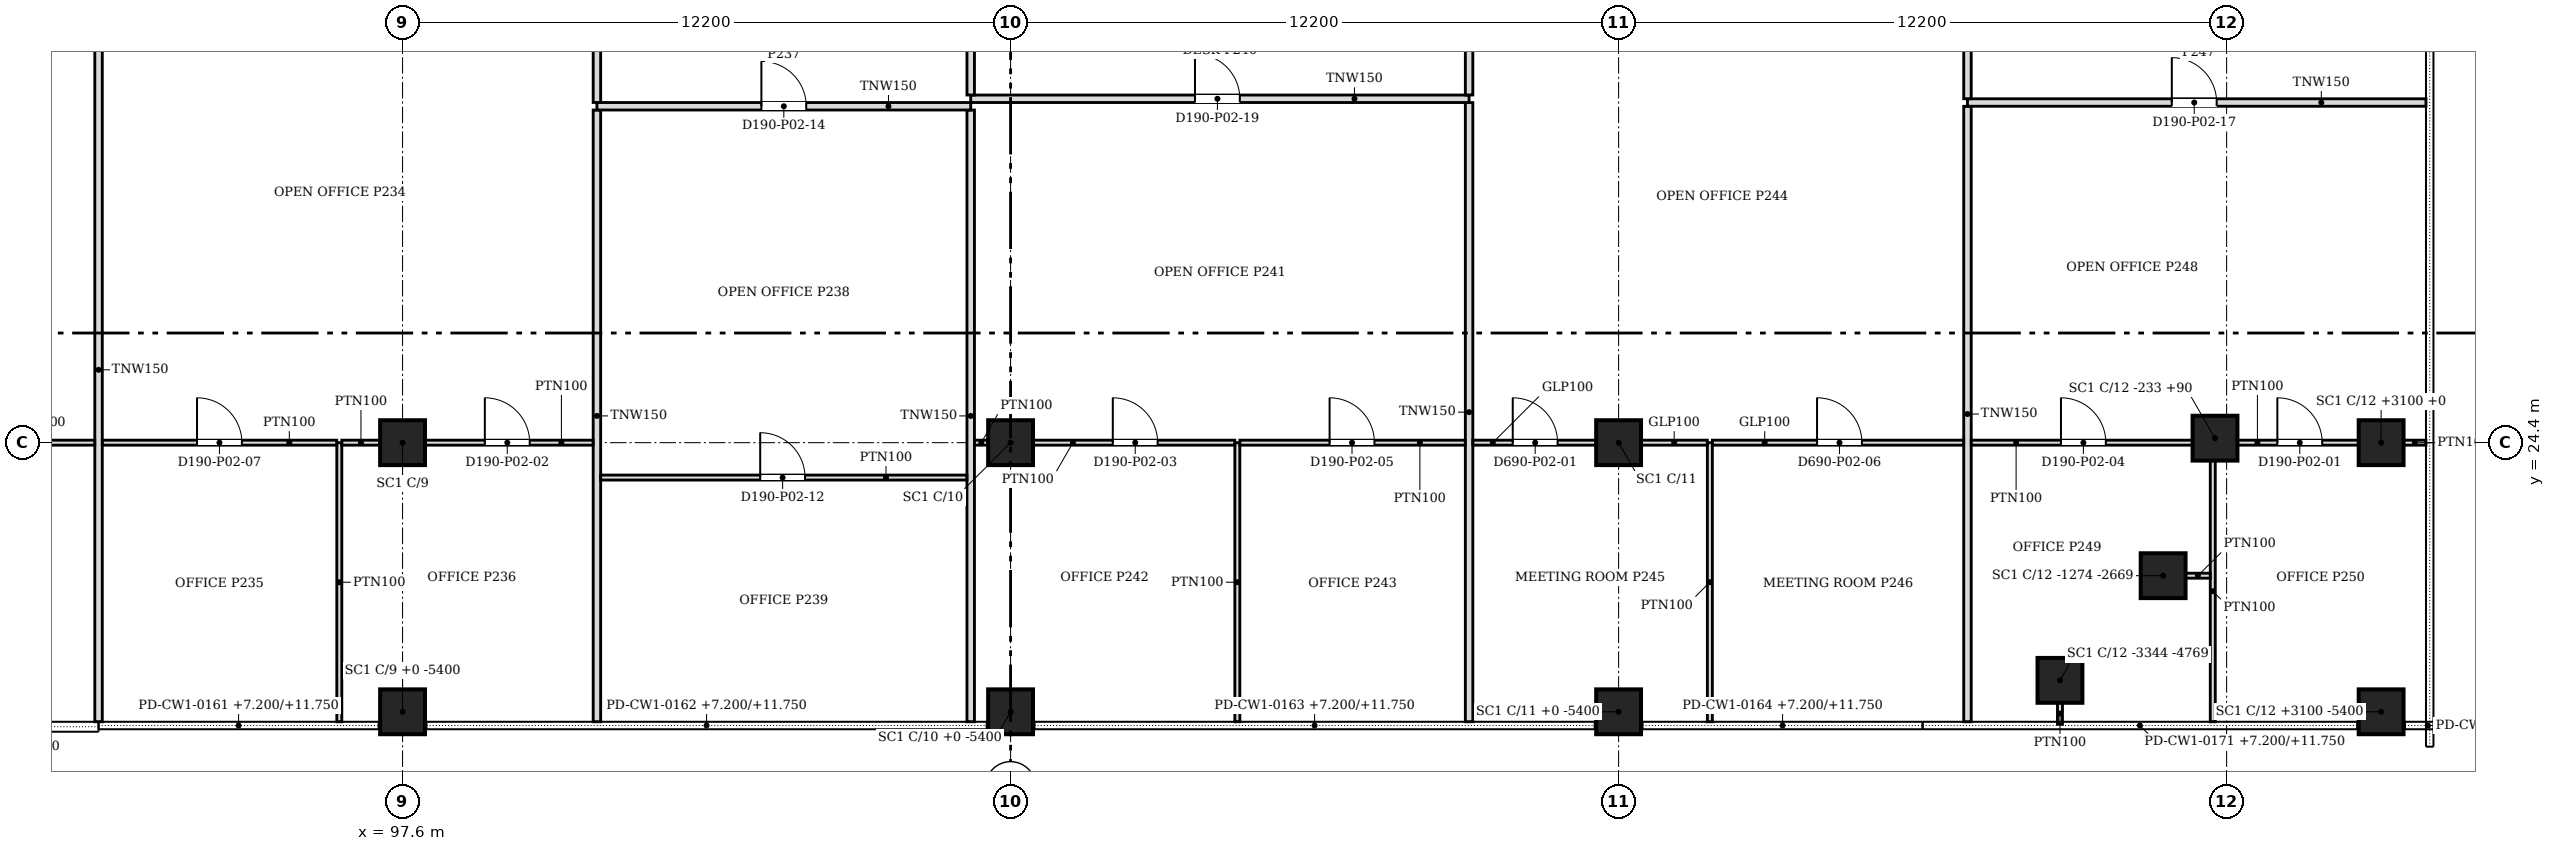
"""IFC4 building model, lengths in metres.
Left out: names, types, materials, properties, quantities, classifications, styles, units other than length and angle.
Written with IfcOpenShell. Run it as: python <this file> out.ifc"""

import sys

from ifc_helpers import new_model, si_unit, direction, frame, frame_2d, origin, origin_2d, place, context, subcontext, project, spatial, rectangle, extrude, source, transform, mapped, element, fill, save


model = new_model("IFC4")
c1 = context("Model", 3, precision=1e-05, world=origin(), true_north=direction((0.0, 1.0)))
c2 = subcontext(c1, "Body", "Model", "MODEL_VIEW")
j1 = project(units=[si_unit("LENGTHUNIT", "METRE"), si_unit("PLANEANGLEUNIT", "RADIAN")], contexts=[c1])
p1 = place(None, origin())
s1 = spatial("IfcSite", under=j1, at=p1, CompositionType="ELEMENT")
p2 = place(p1, origin())
s2 = spatial("IfcBuilding", under=s1, at=p2, CompositionType="ELEMENT")
p3 = place(p2, frame((0.0, 0.0, 7.2)))
s3 = spatial("IfcBuildingStorey", under=s2, at=p3, CompositionType="ELEMENT", Elevation=7.2)
for number, where, z_axis, x_axis in (
    (1, (130.856, 19.631, 0.0), (0.0, 0.0, 1.0), (1.0, 0.0, 0.0)),
    (2, (132.926, 21.731, 0.0), (0.0, 0.0, 1.0), (1.0, 0.0, 0.0)),
    (3, (133.967, 24.49, 0.0), (0.0, 0.0, 1.0), (1.0, 0.0, 0.0)),
    (4, (97.6, 24.4, 0.0), (0.0, 0.0, 1.0), (1.0, 0.0, 0.0)),
    (5, (109.8, 24.4, 0.0), (0.0, 0.0, 1.0), (1.0, 0.0, 0.0)),
    (6, (122.0, 24.4, 0.0), (0.0, 0.0, 1.0), (1.0, 0.0, 0.0)),
    (7, (137.3, 24.4, 0.0), (0.0, 0.0, 1.0), (1.0, 0.0, 0.0)),
    (8, (97.6, 19.0, 0.0), (0.0, 0.0, 1.0), (1.0, 0.0, 0.0)),
    (9, (109.8, 19.0, 0.0), (0.0, 0.0, 1.0), (1.0, 0.0, 0.0)),
    (10, (122.0, 19.0, 0.0), (0.0, 0.0, 1.0), (1.0, 0.0, 0.0)),
    (11, (137.3, 19.0, 0.0), (0.0, 0.0, 1.0), (1.0, 0.0, 0.0)),
):
    element("IfcColumn", number, at=place(p3, frame(where, z_axis=z_axis, x_axis=x_axis)), inside=s3, PredefinedType="COLUMN", context=c2, shape_type="SweptSolid", body=[
        extrude(rectangle(XDim=0.9, YDim=0.9, at=origin_2d()), origin(), (0.0, 0.0, 1.0), 4.55),
    ])
p4 = place(p3, frame((91.5, 18.8, 0.0), z_axis=(0.0, 0.0, 1.0), x_axis=(0.0, 1.0, 0.0)))
e12 = element("IfcWall", 12, at=p4, inside=s3, PredefinedType="PARTITIONING", context=c2, shape_type="SweptSolid", body=[
    extrude(rectangle(XDim=14.124, YDim=0.15, at=frame_2d((7.062, 0.0))), origin(), (0.0, 0.0, 1.0), 3.715),
])
p5 = place(p3, frame((96.331, 18.8, 0.0), z_axis=(0.0, 0.0, 1.0), x_axis=(0.0, 1.0, 0.0)))
e13 = element("IfcWall", 13, at=p5, inside=s3, PredefinedType="PARTITIONING", context=c2, shape_type="SweptSolid", body=[
    extrude(rectangle(XDim=5.6, YDim=0.1, at=frame_2d((2.8, 0.0))), origin(), (0.0, 0.0, 1.0), 3.715),
])
for number, where, z_axis, x_axis in (
    (14, (101.5, 18.8, 0.0), (0.0, 0.0, 1.0), (0.0, 1.0, 0.0)),
    (15, (109.0, 18.8, 0.0), (0.0, 0.0, 1.0), (0.0, 1.0, 0.0)),
):
    element("IfcWall", number, at=place(p3, frame(where, z_axis=z_axis, x_axis=x_axis)), inside=s3, PredefinedType="PARTITIONING", context=c2, shape_type="SweptSolid", body=[
        extrude(rectangle(XDim=12.274, YDim=0.15, at=frame_2d((6.137, 0.0))), origin(), (0.0, 0.0, 1.0), 3.715),
    ])
p6 = place(p3, frame((114.35, 18.8, 0.0), z_axis=(0.0, 0.0, 1.0), x_axis=(0.0, 1.0, 0.0)))
e16 = element("IfcWall", 16, at=p6, inside=s3, PredefinedType="PARTITIONING", context=c2, shape_type="SweptSolid", body=[
    extrude(rectangle(XDim=5.6, YDim=0.1, at=frame_2d((2.8, 0.0))), origin(), (0.0, 0.0, 1.0), 3.715),
])
p7 = place(p3, frame((119.0, 18.8, 0.0), z_axis=(0.0, 0.0, 1.0), x_axis=(0.0, 1.0, 0.0)))
e17 = element("IfcWall", 17, at=p7, inside=s3, PredefinedType="PARTITIONING", context=c2, shape_type="SweptSolid", body=[
    extrude(rectangle(XDim=12.424, YDim=0.15, at=frame_2d((6.212, 0.0))), origin(), (0.0, 0.0, 1.0), 3.715),
])
p8 = place(p3, frame((123.831, 18.8, 0.0), z_axis=(0.0, 0.0, 1.0), x_axis=(0.0, 1.0, 0.0)))
e18 = element("IfcWall", 18, at=p8, inside=s3, PredefinedType="PARTITIONING", context=c2, shape_type="SweptSolid", body=[
    extrude(rectangle(XDim=5.6, YDim=0.1, at=frame_2d((2.8, 0.0))), origin(), (0.0, 0.0, 1.0), 3.715),
])
p9 = place(p3, frame((129.0, 18.8, 0.0), z_axis=(0.0, 0.0, 1.0), x_axis=(0.0, 1.0, 0.0)))
e19 = element("IfcWall", 19, at=p9, inside=s3, PredefinedType="PARTITIONING", context=c2, shape_type="SweptSolid", body=[
    extrude(rectangle(XDim=12.349, YDim=0.15, at=frame_2d((6.174, 0.0))), origin(), (0.0, 0.0, 1.0), 3.715),
])
p10 = place(p3, frame((133.922, 18.8, 0.0), z_axis=(0.0, 0.0, 1.0), x_axis=(0.0, 1.0, 0.0)))
e20 = element("IfcWall", 20, at=p10, inside=s3, PredefinedType="PARTITIONING", context=c2, shape_type="SweptSolid", body=[
    extrude(rectangle(XDim=5.239, YDim=0.1, at=frame_2d((2.62, 0.0))), origin(), (0.0, 0.0, 1.0), 3.715),
])
p11 = place(p3, frame((130.856, 19.181, 0.0), z_axis=(0.0, 0.0, 1.0), x_axis=(0.0, -1.0, 0.0)))
e21 = element("IfcWall", 21, at=p11, inside=s3, PredefinedType="PARTITIONING", context=c2, shape_type="SweptSolid", body=[
    extrude(rectangle(XDim=0.431, YDim=0.1, at=frame_2d((0.215, 0.0))), origin(), (0.0, 0.0, 1.0), 3.715),
])
p12 = place(p3, frame((133.376, 21.731, 0.0), z_axis=(0.0, 0.0, 1.0), x_axis=(1.0, 0.0, 0.0)))
e22 = element("IfcWall", 22, at=p12, inside=s3, PredefinedType="PARTITIONING", context=c2, shape_type="SweptSolid", body=[
    extrude(rectangle(XDim=0.496, YDim=0.1, at=frame_2d((0.248, 0.0))), origin(), (0.0, 0.0, 1.0), 3.715),
])
p13 = place(p3, frame((108.924, 23.7, 0.0), z_axis=(0.0, 0.0, 1.0), x_axis=(-1.0, 0.0, 0.0)))
e23 = element("IfcWall", 23, at=p13, inside=s3, PredefinedType="PARTITIONING", context=c2, shape_type="SweptSolid", body=[
    extrude(rectangle(XDim=7.348, YDim=0.1, at=frame_2d((3.674, 0.0))), origin(), (0.0, 0.0, 1.0), 3.715),
])
m1 = source(origin(), c2, "Body", "SweptSolid", [
    extrude(rectangle(XDim=0.9, YDim=2.1, at=frame_2d((0.45, 1.05))), frame((0.0, 0.06, 0.0), z_axis=(0.0, -1.0, 0.0), x_axis=(1.0, 0.0, 0.0)), (0.0, 0.0, 1.0), 0.12),
])
p14 = place(p13, frame((3.248, 0.0, 0.0)))
e24 = element("IfcOpeningElement", 24, at=p14, cuts=e23, PredefinedType="OPENING", context=c2, shape_type="MappedRepresentation", body=[
    mapped(m1, transform((0.0, 0.0, 0.0), scale=1.0)),
])
p15 = place(p3, frame((91.424, 24.4, 0.0), z_axis=(0.0, 0.0, 1.0), x_axis=(-1.0, 0.0, 0.0)))
e25 = element("IfcWall", 25, at=p15, inside=s3, PredefinedType="PARTITIONING", context=c2, shape_type="SweptSolid", body=[
    extrude(rectangle(XDim=5.323, YDim=0.1, at=frame_2d((2.662, 0.0))), origin(), (0.0, 0.0, 1.0), 3.715),
])
p16 = place(p15, frame((2.223, 0.0, 0.0)))
e26 = element("IfcOpeningElement", 26, at=p16, cuts=e25, PredefinedType="OPENING", context=c2, shape_type="MappedRepresentation", body=[
    mapped(m1, transform((0.0, 0.0, 0.0), scale=1.0)),
])
p17 = place(p3, frame((96.28, 24.4, 0.0), z_axis=(0.0, 0.0, 1.0), x_axis=(-1.0, 0.0, 0.0)))
e27 = element("IfcWall", 27, at=p17, inside=s3, PredefinedType="PARTITIONING", context=c2, shape_type="SweptSolid", body=[
    extrude(rectangle(XDim=4.704, YDim=0.1, at=frame_2d((2.352, 0.0))), origin(), (0.0, 0.0, 1.0), 3.715),
])
p18 = place(p17, frame((1.904, 0.0, 0.0)))
e28 = element("IfcOpeningElement", 28, at=p18, cuts=e27, PredefinedType="OPENING", context=c2, shape_type="MappedRepresentation", body=[
    mapped(m1, transform((0.0, 0.0, 0.0), scale=1.0)),
])
p19 = place(p3, frame((96.382, 24.4, 0.0), z_axis=(0.0, 0.0, 1.0), x_axis=(1.0, 0.0, 0.0)))
e29 = element("IfcWall", 29, at=p19, inside=s3, PredefinedType="PARTITIONING", context=c2, shape_type="SweptSolid", body=[
    extrude(rectangle(XDim=0.767, YDim=0.1, at=frame_2d((0.384, 0.0))), origin(), (0.0, 0.0, 1.0), 3.715),
])
p20 = place(p3, frame((101.424, 24.4, 0.0), z_axis=(0.0, 0.0, 1.0), x_axis=(-1.0, 0.0, 0.0)))
e30 = element("IfcWall", 30, at=p20, inside=s3, PredefinedType="PARTITIONING", context=c2, shape_type="SweptSolid", body=[
    extrude(rectangle(XDim=3.373, YDim=0.1, at=frame_2d((1.687, 0.0))), origin(), (0.0, 0.0, 1.0), 3.715),
])
p21 = place(p20, frame((1.273, 0.0, 0.0)))
e31 = element("IfcOpeningElement", 31, at=p21, cuts=e30, PredefinedType="OPENING", context=c2, shape_type="MappedRepresentation", body=[
    mapped(m1, transform((0.0, 0.0, 0.0), scale=1.0)),
])
p22 = place(p3, frame((109.076, 24.4, 0.0), z_axis=(0.0, 0.0, 1.0), x_axis=(1.0, 0.0, 0.0)))
e32 = element("IfcWall", 32, at=p22, inside=s3, PredefinedType="PARTITIONING", context=c2, shape_type="SweptSolid", body=[
    extrude(rectangle(XDim=0.273, YDim=0.1, at=frame_2d((0.137, 0.0))), origin(), (0.0, 0.0, 1.0), 3.715),
])
p23 = place(p3, frame((114.299, 24.4, 0.0), z_axis=(0.0, 0.0, 1.0), x_axis=(-1.0, 0.0, 0.0)))
e33 = element("IfcWall", 33, at=p23, inside=s3, PredefinedType="PARTITIONING", context=c2, shape_type="SweptSolid", body=[
    extrude(rectangle(XDim=4.048, YDim=0.1, at=frame_2d((2.024, 0.0))), origin(), (0.0, 0.0, 1.0), 3.715),
])
p24 = place(p23, frame((1.548, 0.0, 0.0)))
e34 = element("IfcOpeningElement", 34, at=p24, cuts=e33, PredefinedType="OPENING", context=c2, shape_type="MappedRepresentation", body=[
    mapped(m1, transform((0.0, 0.0, 0.0), scale=1.0)),
])
p25 = place(p3, frame((118.924, 24.4, 0.0), z_axis=(0.0, 0.0, 1.0), x_axis=(-1.0, 0.0, 0.0)))
e35 = element("IfcWall", 35, at=p25, inside=s3, PredefinedType="PARTITIONING", context=c2, shape_type="SweptSolid", body=[
    extrude(rectangle(XDim=4.523, YDim=0.1, at=frame_2d((2.262, 0.0))), origin(), (0.0, 0.0, 1.0), 3.715),
])
p26 = place(p25, frame((1.823, 0.0, 0.0)))
e36 = element("IfcOpeningElement", 36, at=p26, cuts=e35, PredefinedType="OPENING", context=c2, shape_type="MappedRepresentation", body=[
    mapped(m1, transform((0.0, 0.0, 0.0), scale=1.0)),
])
p27 = place(p3, frame((121.549, 24.4, 0.0), z_axis=(0.0, 0.0, 1.0), x_axis=(-1.0, 0.0, 0.0)))
e37 = element("IfcWall", 37, at=p27, inside=s3, PredefinedType="PARTITIONING", context=c2, shape_type="SweptSolid", body=[
    extrude(rectangle(XDim=2.473, YDim=0.1, at=frame_2d((1.237, 0.0))), origin(), (0.0, 0.0, 1.0), 3.715),
])
p28 = place(p27, frame((0.773, 0.0, 0.0)))
e38 = element("IfcOpeningElement", 38, at=p28, cuts=e37, PredefinedType="OPENING", context=c2, shape_type="MappedRepresentation", body=[
    mapped(m1, transform((0.0, 0.0, 0.0), scale=1.0)),
])
p29 = place(p3, frame((122.451, 24.4, 0.0), z_axis=(0.0, 0.0, 1.0), x_axis=(1.0, 0.0, 0.0)))
e39 = element("IfcWall", 39, at=p29, inside=s3, PredefinedType="PARTITIONING", context=c2, shape_type="SweptSolid", body=[
    extrude(rectangle(XDim=1.329, YDim=0.1, at=frame_2d((0.665, 0.0))), origin(), (0.0, 0.0, 1.0), 3.715),
])
p30 = place(p3, frame((128.924, 24.4, 0.0), z_axis=(0.0, 0.0, 1.0), x_axis=(-1.0, 0.0, 0.0)))
e40 = element("IfcWall", 40, at=p30, inside=s3, PredefinedType="PARTITIONING", context=c2, shape_type="SweptSolid", body=[
    extrude(rectangle(XDim=5.042, YDim=0.1, at=frame_2d((2.521, 0.0))), origin(), (0.0, 0.0, 1.0), 3.715),
])
p31 = place(p30, frame((2.042, 0.0, 0.0)))
e41 = element("IfcOpeningElement", 41, at=p31, cuts=e40, PredefinedType="OPENING", context=c2, shape_type="MappedRepresentation", body=[
    mapped(m1, transform((0.0, 0.0, 0.0), scale=1.0)),
])
p32 = place(p3, frame((133.516, 24.4, 0.0), z_axis=(0.0, 0.0, 1.0), x_axis=(-1.0, 0.0, 0.0)))
e42 = element("IfcWall", 42, at=p32, inside=s3, PredefinedType="PARTITIONING", context=c2, shape_type="SweptSolid", body=[
    extrude(rectangle(XDim=4.44, YDim=0.1, at=frame_2d((2.22, 0.0))), origin(), (0.0, 0.0, 1.0), 3.715),
])
p33 = place(p32, frame((1.74, 0.0, 0.0)))
e43 = element("IfcOpeningElement", 43, at=p33, cuts=e42, PredefinedType="OPENING", context=c2, shape_type="MappedRepresentation", body=[
    mapped(m1, transform((0.0, 0.0, 0.0), scale=1.0)),
])
p34 = place(p3, frame((136.849, 24.4, 0.0), z_axis=(0.0, 0.0, 1.0), x_axis=(-1.0, 0.0, 0.0)))
e44 = element("IfcWall", 44, at=p34, inside=s3, PredefinedType="PARTITIONING", context=c2, shape_type="SweptSolid", body=[
    extrude(rectangle(XDim=2.431, YDim=0.1, at=frame_2d((1.216, 0.0))), origin(), (0.0, 0.0, 1.0), 3.715),
])
p35 = place(p34, frame((0.731, 0.0, 0.0)))
e45 = element("IfcOpeningElement", 45, at=p35, cuts=e44, PredefinedType="OPENING", context=c2, shape_type="MappedRepresentation", body=[
    mapped(m1, transform((0.0, 0.0, 0.0), scale=1.0)),
])
p36 = place(p3, frame((137.751, 24.4, 0.0), z_axis=(0.0, 0.0, 1.0), x_axis=(1.0, 0.0, 0.0)))
e46 = element("IfcWall", 46, at=p36, inside=s3, PredefinedType="PARTITIONING", context=c2, shape_type="SweptSolid", body=[
    extrude(rectangle(XDim=0.449, YDim=0.1, at=frame_2d((0.225, 0.0))), origin(), (0.0, 0.0, 1.0), 3.715),
])
p37 = place(p3, frame((109.0, 31.15, 0.0), z_axis=(0.0, 0.0, 1.0), x_axis=(-1.0, 0.0, 0.0)))
e47 = element("IfcWall", 47, at=p37, inside=s3, PredefinedType="PARTITIONING", context=c2, shape_type="SweptSolid", body=[
    extrude(rectangle(XDim=7.5, YDim=0.15, at=frame_2d((3.75, 0.0))), origin(), (0.0, 0.0, 1.0), 3.715),
])
m2 = source(origin(), c2, "Body", "SweptSolid", [
    extrude(rectangle(XDim=0.9, YDim=2.1, at=frame_2d((0.45, 1.05))), frame((0.0, 0.085, 0.0), z_axis=(0.0, -1.0, 0.0), x_axis=(1.0, 0.0, 0.0)), (0.0, 0.0, 1.0), 0.17),
])
p38 = place(p37, frame((3.3, 0.0, 0.0)))
e48 = element("IfcOpeningElement", 48, at=p38, cuts=e47, PredefinedType="OPENING", context=c2, shape_type="MappedRepresentation", body=[
    mapped(m2, transform((0.0, 0.0, 0.0), scale=1.0)),
])
p39 = place(p3, frame((101.5, 31.226, 0.0), z_axis=(0.0, 0.0, 1.0), x_axis=(0.0, 1.0, 0.0)))
e49 = element("IfcWall", 49, at=p39, inside=s3, PredefinedType="PARTITIONING", context=c2, shape_type="SweptSolid", body=[
    extrude(rectangle(XDim=2.898, YDim=0.15, at=frame_2d((1.449, 0.0))), origin(), (0.0, 0.0, 1.0), 3.715),
])
p40 = place(p3, frame((138.2, 31.225, 0.0), z_axis=(0.0, 0.0, 1.0), x_axis=(-1.0, 0.0, 0.0)))
e50 = element("IfcWall", 50, at=p40, inside=s3, PredefinedType="PARTITIONING", context=c2, shape_type="SweptSolid", body=[
    extrude(rectangle(XDim=9.2, YDim=0.15, at=frame_2d((4.6, 0.0))), origin(), (0.0, 0.0, 1.0), 3.715),
])
p41 = place(p40, frame((4.2, 0.0, 0.0)))
e51 = element("IfcOpeningElement", 51, at=p41, cuts=e50, PredefinedType="OPENING", context=c2, shape_type="MappedRepresentation", body=[
    mapped(m2, transform((0.0, 0.0, 0.0), scale=1.0)),
])
p42 = place(p3, frame((119.0, 31.3, 0.0), z_axis=(0.0, 0.0, 1.0), x_axis=(-1.0, 0.0, 0.0)))
e52 = element("IfcWall", 52, at=p42, inside=s3, PredefinedType="PARTITIONING", context=c2, shape_type="SweptSolid", body=[
    extrude(rectangle(XDim=10.0, YDim=0.15, at=frame_2d((5.0, 0.0))), origin(), (0.0, 0.0, 1.0), 3.715),
])
p43 = place(p42, frame((4.6, 0.0, 0.0)))
e53 = element("IfcOpeningElement", 53, at=p43, cuts=e52, PredefinedType="OPENING", context=c2, shape_type="MappedRepresentation", body=[
    mapped(m2, transform((0.0, 0.0, 0.0), scale=1.0)),
])
p44 = place(p3, frame((129.0, 31.301, 0.0), z_axis=(0.0, 0.0, 1.0), x_axis=(0.0, 1.0, 0.0)))
e54 = element("IfcWall", 54, at=p44, inside=s3, PredefinedType="PARTITIONING", context=c2, shape_type="SweptSolid", body=[
    extrude(rectangle(XDim=2.823, YDim=0.15, at=frame_2d((1.412, 0.0))), origin(), (0.0, 0.0, 1.0), 3.715),
])
for number, where, z_axis, x_axis in (
    (55, (109.0, 31.376, 0.0), (0.0, 0.0, 1.0), (0.0, 1.0, 0.0)),
    (56, (119.0, 31.376, 0.0), (0.0, 0.0, 1.0), (0.0, 1.0, 0.0)),
):
    element("IfcWall", number, at=place(p3, frame(where, z_axis=z_axis, x_axis=x_axis)), inside=s3, PredefinedType="PARTITIONING", context=c2, shape_type="SweptSolid", body=[
        extrude(rectangle(XDim=2.748, YDim=0.15, at=frame_2d((1.374, 0.0))), origin(), (0.0, 0.0, 1.0), 3.715),
    ])
m3 = source(origin(), c2, "Body", "SweptSolid", [
    extrude(rectangle(XDim=0.9, YDim=2.1, at=frame_2d((0.45, 1.05))), frame((0.0, 0.025, 0.0), z_axis=(0.0, -1.0, 0.0), x_axis=(1.0, 0.0, 0.0)), (0.0, 0.0, 1.0), 0.05),
])
p45 = place(p35, origin())
e57 = element("IfcDoor", 57, at=p45, inside=s3, OperationType="SINGLE_SWING_RIGHT", PredefinedType="DOOR", context=c2, shape_type="MappedRepresentation", body=[
    mapped(m3, transform((0.0, 0.0, 0.0), scale=1.0)),
])
fill(e45, e57)
p46 = place(p28, origin())
e58 = element("IfcDoor", 58, at=p46, inside=s3, OperationType="SINGLE_SWING_RIGHT", PredefinedType="DOOR", context=c2, shape_type="MappedRepresentation", body=[
    mapped(m3, transform((0.0, 0.0, 0.0), scale=1.0)),
])
fill(e38, e58)
p47 = place(p21, origin())
e59 = element("IfcDoor", 59, at=p47, inside=s3, OperationType="SINGLE_SWING_RIGHT", PredefinedType="DOOR", context=c2, shape_type="MappedRepresentation", body=[
    mapped(m3, transform((0.0, 0.0, 0.0), scale=1.0)),
])
fill(e31, e59)
p48 = place(p24, origin())
e60 = element("IfcDoor", 60, at=p48, inside=s3, OperationType="SINGLE_SWING_RIGHT", PredefinedType="DOOR", context=c2, shape_type="MappedRepresentation", body=[
    mapped(m3, transform((0.0, 0.0, 0.0), scale=1.0)),
])
fill(e34, e60)
p49 = place(p33, origin())
e61 = element("IfcDoor", 61, at=p49, inside=s3, OperationType="SINGLE_SWING_RIGHT", PredefinedType="DOOR", context=c2, shape_type="MappedRepresentation", body=[
    mapped(m3, transform((0.0, 0.0, 0.0), scale=1.0)),
])
fill(e43, e61)
p50 = place(p26, origin())
e62 = element("IfcDoor", 62, at=p50, inside=s3, OperationType="SINGLE_SWING_RIGHT", PredefinedType="DOOR", context=c2, shape_type="MappedRepresentation", body=[
    mapped(m3, transform((0.0, 0.0, 0.0), scale=1.0)),
])
fill(e36, e62)
p51 = place(p18, origin())
e63 = element("IfcDoor", 63, at=p51, inside=s3, OperationType="SINGLE_SWING_RIGHT", PredefinedType="DOOR", context=c2, shape_type="MappedRepresentation", body=[
    mapped(m3, transform((0.0, 0.0, 0.0), scale=1.0)),
])
fill(e28, e63)
p52 = place(p31, origin())
e64 = element("IfcDoor", 64, at=p52, inside=s3, OperationType="SINGLE_SWING_RIGHT", PredefinedType="DOOR", context=c2, shape_type="MappedRepresentation", body=[
    mapped(m3, transform((0.0, 0.0, 0.0), scale=1.0)),
])
fill(e41, e64)
p53 = place(p14, origin())
e65 = element("IfcDoor", 65, at=p53, inside=s3, OperationType="SINGLE_SWING_RIGHT", PredefinedType="DOOR", context=c2, shape_type="MappedRepresentation", body=[
    mapped(m3, transform((0.0, 0.0, 0.0), scale=1.0)),
])
fill(e24, e65)
p54 = place(p38, origin())
e66 = element("IfcDoor", 66, at=p54, inside=s3, OperationType="SINGLE_SWING_RIGHT", PredefinedType="DOOR", context=c2, shape_type="MappedRepresentation", body=[
    mapped(m3, transform((0.0, 0.0, 0.0), scale=1.0)),
])
fill(e48, e66)
p55 = place(p41, origin())
e67 = element("IfcDoor", 67, at=p55, inside=s3, OperationType="SINGLE_SWING_RIGHT", PredefinedType="DOOR", context=c2, shape_type="MappedRepresentation", body=[
    mapped(m3, transform((0.0, 0.0, 0.0), scale=1.0)),
])
fill(e51, e67)
p56 = place(p43, origin())
e68 = element("IfcDoor", 68, at=p56, inside=s3, OperationType="SINGLE_SWING_RIGHT", PredefinedType="DOOR", context=c2, shape_type="MappedRepresentation", body=[
    mapped(m3, transform((0.0, 0.0, 0.0), scale=1.0)),
])
fill(e53, e68)
save(model, sys.argv[1])
